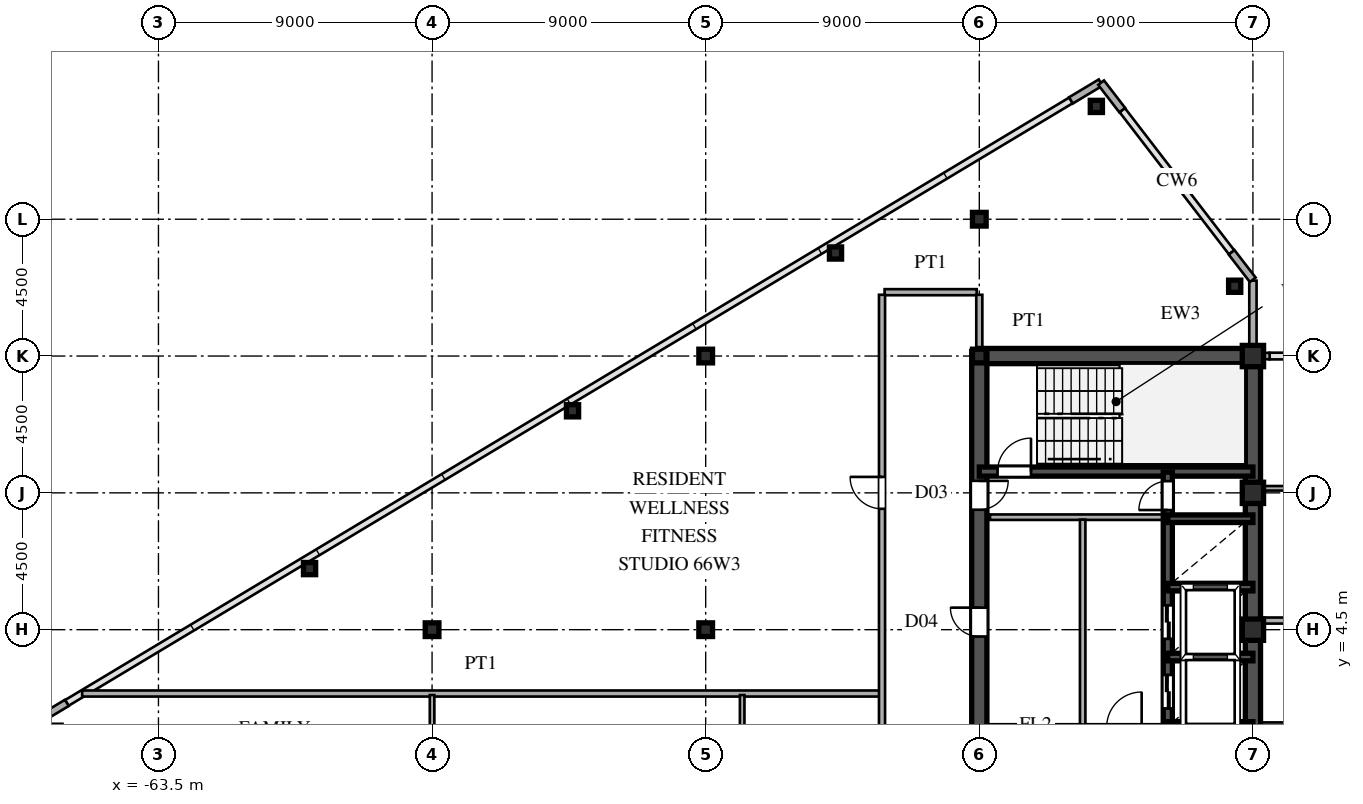
"""IFC4 building model, lengths in metres.
Left out: names, types, materials, properties, quantities, classifications, styles, units other than length and angle.
Written with IfcOpenShell. Run it as: python <this file> out.ifc"""

import sys

from ifc_helpers import new_model, si_unit, direction, frame, frame_2d, origin, origin_2d, place, context, subcontext, project, spatial, rectangle, hollow_rectangle, i_section, extrude, source, transform, mapped, element, fill, save


model = new_model("IFC4")
c1 = context("Model", 3, precision=1e-05, world=origin(), true_north=direction((0.0, 1.0)))
c2 = subcontext(c1, "Body", "Model", "MODEL_VIEW")
j1 = project(units=[si_unit("LENGTHUNIT", "METRE"), si_unit("PLANEANGLEUNIT", "RADIAN")], contexts=[c1])
p1 = place(None, origin())
s1 = spatial("IfcSite", under=j1, at=p1, CompositionType="ELEMENT")
p2 = place(p1, origin())
s2 = spatial("IfcBuilding", under=s1, at=p2, CompositionType="ELEMENT")
p3 = place(p2, frame((0.0, 0.0, 250.65)))
s3 = spatial("IfcBuildingStorey", under=s2, at=p3, CompositionType="ELEMENT", Elevation=250.65)
m1 = source(origin(), c2, "Body", "SweptSolid", [
    extrude(hollow_rectangle(XDim=0.7, YDim=0.7, WallThickness=0.03, at=origin_2d()), origin(), (0.0, 0.0, 1.0), 3.75),
])
for number, where, z_axis, x_axis in (
    (1, (-27.5, 4.5, 0.0), (0.0, 0.0, 1.0), (1.0, 0.0, 0.0)),
    (2, (-27.5, 9.0, 0.0), (0.0, 0.0, 1.0), (1.0, 0.0, 0.0)),
    (3, (-27.5, 13.5, 0.0), (0.0, 0.0, 1.0), (1.0, 0.0, 0.0)),
):
    element("IfcColumn", number, at=place(p3, frame(where, z_axis=z_axis, x_axis=x_axis)), inside=s3, PredefinedType="COLUMN", context=c2, shape_type="MappedRepresentation", body=[
        mapped(m1, transform((0.0, 0.0, 0.0), scale=1.0)),
    ])
m2 = source(origin(), c2, "Body", "SweptSolid", [
    extrude(i_section(OverallWidth=0.45, OverallDepth=0.45, WebThickness=0.016, FlangeThickness=0.025, at=origin_2d()), origin(), (0.0, 0.0, 1.0), 3.75),
])
for number, where, z_axis, x_axis in (
    (4, (-36.5, 13.5, 0.0), (0.0, 0.0, 1.0), (1.0, 0.0, 0.0)),
    (5, (-36.5, 18.0, 0.0), (0.0, 0.0, 1.0), (1.0, 0.0, 0.0)),
    (6, (-45.5, 4.5, 0.0), (0.0, 0.0, 1.0), (1.0, 0.0, 0.0)),
    (7, (-45.5, 13.5, 0.0), (0.0, 0.0, 1.0), (1.0, 0.0, 0.0)),
    (8, (-54.5, 4.5, 0.0), (0.0, 0.0, 1.0), (1.0, 0.0, 0.0)),
):
    element("IfcColumn", number, at=place(p3, frame(where, z_axis=z_axis, x_axis=x_axis)), inside=s3, PredefinedType="COLUMN", context=c2, shape_type="MappedRepresentation", body=[
        mapped(m2, transform((0.0, 0.0, 0.0), scale=1.0)),
    ])
m3 = source(origin(), c2, "Body", "SweptSolid", [
    extrude(hollow_rectangle(XDim=0.4, YDim=0.4, WallThickness=0.016, at=origin_2d()), origin(), (0.0, 0.0, 1.0), 3.75),
])
for number, where, z_axis, x_axis in (
    (9, (-28.1, 15.796, 0.0), (0.0, 0.0, 1.0), (1.0, 0.0, 0.0)),
    (10, (-32.65, 21.71, 0.0), (0.0, 0.0, 1.0), (1.0, 0.0, 0.0)),
    (11, (-41.23, 16.889, 0.0), (0.0, 0.0, 1.0), (1.0, 0.0, 0.0)),
    (12, (-49.88, 11.699, 0.0), (0.0, 0.0, 1.0), (1.0, 0.0, 0.0)),
    (13, (-58.53, 6.509, 0.0), (0.0, 0.0, 1.0), (1.0, 0.0, 0.0)),
):
    element("IfcColumn", number, at=place(p3, frame(where, z_axis=z_axis, x_axis=x_axis)), inside=s3, PredefinedType="COLUMN", context=c2, shape_type="MappedRepresentation", body=[
        mapped(m3, transform((0.0, 0.0, 0.0), scale=1.0)),
    ])
p4 = place(p3, frame((-27.5, 13.755, 0.0), z_axis=(0.0, 0.0, 1.0), x_axis=(0.0, 1.0, 0.0)))
e14 = element("IfcWall", 14, at=p4, inside=s3, PredefinedType="SOLIDWALL", context=c2, shape_type="SweptSolid", body=[
    extrude(rectangle(XDim=0.62, YDim=0.24, at=frame_2d((0.31, 0.0))), origin(), (0.0, 0.0, 1.0), 3.03),
])
p5 = place(p3, frame((-27.5, 14.375, 0.0), z_axis=(0.0, 0.0, 1.0), x_axis=(0.0, 1.0, 0.0)))
e15 = element("IfcWall", 15, at=p5, inside=s3, PredefinedType="SOLIDWALL", context=c2, shape_type="SweptSolid", body=[
    extrude(rectangle(XDim=1.605, YDim=0.24, at=frame_2d((0.803, 0.0))), origin(), (0.0, 0.0, 1.0), 3.53),
])
for number, where, z_axis, x_axis in (
    (16, (-27.506, 16.008, 0.0), (0.0, 0.0, 1.0), (-0.61, 0.793, 0.0)),
    (17, (-31.799, 21.588, 0.0), (0.0, 0.0, 1.0), (-0.61, 0.793, 0.0)),
    (18, (-32.509, 22.495, 0.0), (0.0, 0.0, 1.0), (-0.857, -0.515, 0.0)),
    (19, (-66.514, 2.092, 0.0), (0.0, 0.0, 1.0), (-0.857, -0.515, 0.0)),
):
    element("IfcWall", number, at=place(p3, frame(where, z_axis=z_axis, x_axis=x_axis)), inside=s3, PredefinedType="SOLIDWALL", context=c2, shape_type="SweptSolid", body=[
        extrude(rectangle(XDim=1.14, YDim=0.24, at=frame_2d((0.57, 0.0))), origin(), (0.0, 0.0, 1.0), 3.53),
    ])
p6 = place(p3, frame((-27.49, 13.5, 0.0), z_axis=(0.0, 0.0, 1.0), x_axis=(1.0, 0.0, 0.0)))
e20 = element("IfcWall", 20, at=p6, inside=s3, PredefinedType="SOLIDWALL", context=c2, shape_type="SweptSolid", body=[
    extrude(rectangle(XDim=0.54, YDim=0.21, at=frame_2d((0.27, 0.0))), origin(), (0.0, 0.0, 1.0), 3.03),
])
p7 = place(p3, frame((-27.5, 1.3, 0.0), z_axis=(0.0, 0.0, 1.0), x_axis=(0.0, 1.0, 0.0)))
e21 = element("IfcWall", 21, at=p7, inside=s3, PredefinedType="SHEAR", context=c2, shape_type="SweptSolid", body=[
    extrude(rectangle(XDim=12.2, YDim=0.5, at=frame_2d((6.1, 0.0))), origin(), (0.0, 0.0, 1.0), 3.53),
])
p8 = place(p3, frame((-36.5, 13.5, 0.0), z_axis=(0.0, 0.0, 1.0), x_axis=(1.0, 0.0, 0.0)))
e22 = element("IfcWall", 22, at=p8, inside=s3, PredefinedType="SHEAR", context=c2, shape_type="SweptSolid", body=[
    extrude(rectangle(XDim=9.0, YDim=0.5, at=frame_2d((4.5, 0.0))), origin(), (0.0, 0.0, 1.0), 3.53),
])
p9 = place(p3, frame((-36.5, 8.2, 0.0), z_axis=(0.0, 0.0, 1.0), x_axis=(0.0, 1.0, 0.0)))
e23 = element("IfcWall", 23, at=p9, inside=s3, PredefinedType="SHEAR", context=c2, shape_type="SweptSolid", body=[
    extrude(rectangle(XDim=5.45, YDim=0.5, at=frame_2d((2.725, 0.0))), origin(), (0.0, 0.0, 1.0), 3.53),
])
p10 = place(p9, frame((0.245, 0.0, 0.0)))
e24 = element("IfcOpeningElement", 24, at=p10, cuts=e23, PredefinedType="OPENING", context=c2, shape_type="SweptSolid", body=[
    extrude(rectangle(XDim=0.95, YDim=2.15, at=frame_2d((0.475, 1.075))), frame((0.0, 0.26, 0.0), z_axis=(0.0, -1.0, 0.0), x_axis=(1.0, 0.0, 0.0)), (0.0, 0.0, 1.0), 0.52),
])
p11 = place(p3, frame((-36.5, 1.3, 0.0), z_axis=(0.0, 0.0, 1.0), x_axis=(0.0, 1.0, 0.0)))
e25 = element("IfcWall", 25, at=p11, inside=s3, PredefinedType="SHEAR", context=c2, shape_type="SweptSolid", body=[
    extrude(rectangle(XDim=6.9, YDim=0.5, at=frame_2d((3.45, 0.0))), origin(), (0.0, 0.0, 1.0), 3.53),
])
p12 = place(p11, frame((2.975, 0.0, 0.0)))
e26 = element("IfcOpeningElement", 26, at=p12, cuts=e25, PredefinedType="OPENING", context=c2, shape_type="SweptSolid", body=[
    extrude(rectangle(XDim=0.95, YDim=2.15, at=frame_2d((0.475, 1.075))), frame((0.0, 0.26, 0.0), z_axis=(0.0, -1.0, 0.0), x_axis=(1.0, 0.0, 0.0)), (0.0, 0.0, 1.0), 0.52),
])
p13 = place(p3, frame((-36.5, 9.7, 0.0), z_axis=(0.0, 0.0, 1.0), x_axis=(1.0, 0.0, 0.0)))
e27 = element("IfcWall", 27, at=p13, inside=s3, PredefinedType="SHEAR", context=c2, shape_type="SweptSolid", body=[
    extrude(rectangle(XDim=9.0, YDim=0.3, at=frame_2d((4.5, 0.0))), origin(), (0.0, 0.0, 1.0), 3.53),
])
p14 = place(p13, frame((0.6, 0.0, 0.0)))
e28 = element("IfcOpeningElement", 28, at=p14, cuts=e27, PredefinedType="OPENING", context=c2, shape_type="SweptSolid", body=[
    extrude(rectangle(XDim=1.1, YDim=2.2, at=frame_2d((0.55, 1.1))), frame((0.0, 0.16, 0.0), z_axis=(0.0, -1.0, 0.0), x_axis=(1.0, 0.0, 0.0)), (0.0, 0.0, 1.0), 0.32),
])
for number, where, z_axis, x_axis in (
    (29, (-30.3, 1.35, 0.0), (0.0, 0.0, 1.0), (1.0, 0.0, 0.0)),
    (30, (-30.3, 3.6, 0.0), (0.0, 0.0, 1.0), (1.0, 0.0, 0.0)),
    (31, (-30.3, 5.9, 0.0), (0.0, 0.0, 1.0), (1.0, 0.0, 0.0)),
    (32, (-30.3, 8.15, 0.0), (0.0, 0.0, 1.0), (1.0, 0.0, 0.0)),
):
    element("IfcWall", number, at=place(p3, frame(where, z_axis=z_axis, x_axis=x_axis)), inside=s3, PredefinedType="SHEAR", context=c2, shape_type="SweptSolid", body=[
        extrude(rectangle(XDim=2.8, YDim=0.25, at=frame_2d((1.4, 0.0))), origin(), (0.0, 0.0, 1.0), 3.53),
    ])
p15 = place(p3, frame((-30.3, 1.32, 0.0), z_axis=(0.0, 0.0, 1.0), x_axis=(0.0, 1.0, 0.0)))
e33 = element("IfcWall", 33, at=p15, inside=s3, PredefinedType="SHEAR", context=c2, shape_type="SweptSolid", body=[
    extrude(rectangle(XDim=2.28, YDim=0.3, at=frame_2d((1.14, 0.0))), origin(), (0.0, 0.0, 1.0), 3.53),
])
p16 = place(p15, frame((0.59, 0.0, 0.0)))
e34 = element("IfcOpeningElement", 34, at=p16, cuts=e33, PredefinedType="OPENING", context=c2, shape_type="SweptSolid", body=[
    extrude(rectangle(XDim=1.1, YDim=2.2, at=frame_2d((0.55, 1.1))), frame((0.0, 0.16, 0.0), z_axis=(0.0, -1.0, 0.0), x_axis=(1.0, 0.0, 0.0)), (0.0, 0.0, 1.0), 0.32),
])
p17 = place(p3, frame((-30.3, 3.6, 0.0), z_axis=(0.0, 0.0, 1.0), x_axis=(0.0, 1.0, 0.0)))
e35 = element("IfcWall", 35, at=p17, inside=s3, PredefinedType="SHEAR", context=c2, shape_type="SweptSolid", body=[
    extrude(rectangle(XDim=2.3, YDim=0.3, at=frame_2d((1.15, 0.0))), origin(), (0.0, 0.0, 1.0), 3.53),
])
p18 = place(p17, frame((0.6, 0.0, 0.0)))
e36 = element("IfcOpeningElement", 36, at=p18, cuts=e35, PredefinedType="OPENING", context=c2, shape_type="SweptSolid", body=[
    extrude(rectangle(XDim=1.1, YDim=2.2, at=frame_2d((0.55, 1.1))), frame((0.0, 0.16, 0.0), z_axis=(0.0, -1.0, 0.0), x_axis=(1.0, 0.0, 0.0)), (0.0, 0.0, 1.0), 0.32),
])
p19 = place(p3, frame((-30.3, 5.9, 0.0), z_axis=(0.0, 0.0, 1.0), x_axis=(0.0, 1.0, 0.0)))
e37 = element("IfcWall", 37, at=p19, inside=s3, PredefinedType="SHEAR", context=c2, shape_type="SweptSolid", body=[
    extrude(rectangle(XDim=2.25, YDim=0.3, at=frame_2d((1.125, 0.0))), origin(), (0.0, 0.0, 1.0), 3.53),
])
p20 = place(p3, frame((-30.3, 8.15, 0.0), z_axis=(0.0, 0.0, 1.0), x_axis=(0.0, 1.0, 0.0)))
e38 = element("IfcWall", 38, at=p20, inside=s3, PredefinedType="SHEAR", context=c2, shape_type="SweptSolid", body=[
    extrude(rectangle(XDim=1.53, YDim=0.3, at=frame_2d((0.765, 0.0))), origin(), (0.0, 0.0, 1.0), 3.53),
])
p21 = place(p20, frame((0.285, 0.0, 0.0)))
e39 = element("IfcOpeningElement", 39, at=p21, cuts=e38, PredefinedType="OPENING", context=c2, shape_type="SweptSolid", body=[
    extrude(rectangle(XDim=0.95, YDim=2.15, at=frame_2d((0.475, 1.075))), frame((0.0, 0.16, 0.0), z_axis=(0.0, -1.0, 0.0), x_axis=(1.0, 0.0, 0.0)), (0.0, 0.0, 1.0), 0.32),
])
p22 = place(p3, frame((-36.15, 8.2, 0.0), z_axis=(0.0, 0.0, 1.0), x_axis=(1.0, 0.0, 0.0)))
e40 = element("IfcWall", 40, at=p22, inside=s3, PredefinedType="PARTITIONING", context=c2, shape_type="SweptSolid", body=[
    extrude(rectangle(XDim=5.7, YDim=0.18, at=frame_2d((2.85, 0.0))), origin(), (0.0, 0.0, 1.0), 3.53),
])
p23 = place(p3, frame((-33.1, 1.38, 0.0), z_axis=(0.0, 0.0, 1.0), x_axis=(0.0, 1.0, 0.0)))
e41 = element("IfcWall", 41, at=p23, inside=s3, PredefinedType="PARTITIONING", context=c2, shape_type="SweptSolid", body=[
    extrude(rectangle(XDim=6.74, YDim=0.18, at=frame_2d((3.37, 0.0))), origin(), (0.0, 0.0, 1.0), 3.53),
])
p24 = place(p3, frame((-27.245, 1.35, 0.0), z_axis=(0.0, 0.0, 1.0), x_axis=(1.0, 0.0, 0.0)))
e42 = element("IfcWall", 42, at=p24, inside=s3, PredefinedType="PARTITIONING", context=c2, shape_type="SweptSolid", body=[
    extrude(rectangle(XDim=20.16, YDim=0.2, at=frame_2d((10.08, 0.0))), origin(), (0.0, 0.0, 1.0), 3.53),
])
p25 = place(p24, frame((12.97, 0.0, 0.0)))
e43 = element("IfcOpeningElement", 43, at=p25, cuts=e42, PredefinedType="OPENING", context=c2, shape_type="SweptSolid", body=[
    extrude(rectangle(XDim=1.05, YDim=2.25, at=frame_2d((0.525, 1.125))), frame((0.0, 0.11, 0.0), z_axis=(0.0, -1.0, 0.0), x_axis=(1.0, 0.0, 0.0)), (0.0, 0.0, 1.0), 0.22),
])
p26 = place(p3, frame((-66.01, 2.4, 0.0), z_axis=(0.0, 0.0, 1.0), x_axis=(1.0, 0.0, 0.0)))
e44 = element("IfcWall", 44, at=p26, inside=s3, PredefinedType="PARTITIONING", context=c2, shape_type="SweptSolid", body=[
    extrude(rectangle(XDim=26.23, YDim=0.2, at=frame_2d((13.115, 0.0))), origin(), (0.0, 0.0, 1.0), 3.53),
])
p27 = place(p3, frame((-27.245, 4.8, 0.0), z_axis=(0.0, 0.0, 1.0), x_axis=(1.0, 0.0, 0.0)))
e45 = element("IfcWall", 45, at=p27, inside=s3, PredefinedType="PARTITIONING", context=c2, shape_type="SweptSolid", body=[
    extrude(rectangle(XDim=54.49, YDim=0.2, at=frame_2d((27.245, 0.0))), origin(), (0.0, 0.0, 1.0), 3.53),
])
p28 = place(p27, frame((24.97, 0.0, 0.0)))
e46 = element("IfcOpeningElement", 46, at=p28, cuts=e45, PredefinedType="OPENING", context=c2, shape_type="SweptSolid", body=[
    extrude(rectangle(XDim=1.05, YDim=2.25, at=frame_2d((0.525, 1.125))), frame((0.0, 0.11, 0.0), z_axis=(0.0, -1.0, 0.0), x_axis=(1.0, 0.0, 0.0)), (0.0, 0.0, 1.0), 0.22),
])
p29 = place(p3, frame((-27.245, 9.15, 0.0), z_axis=(0.0, 0.0, 1.0), x_axis=(1.0, 0.0, 0.0)))
e47 = element("IfcWall", 47, at=p29, inside=s3, PredefinedType="PARTITIONING", context=c2, shape_type="SweptSolid", body=[
    extrude(rectangle(XDim=7.66, YDim=0.15, at=frame_2d((3.83, 0.0))), origin(), (0.0, 0.0, 1.0), 3.53),
])
p30 = place(p29, frame((3.57, 0.0, 0.0)))
e48 = element("IfcOpeningElement", 48, at=p30, cuts=e47, PredefinedType="OPENING", context=c2, shape_type="SweptSolid", body=[
    extrude(rectangle(XDim=0.95, YDim=2.15, at=frame_2d((0.475, 1.075))), frame((0.0, 0.085, 0.0), z_axis=(0.0, -1.0, 0.0), x_axis=(1.0, 0.0, 0.0)), (0.0, 0.0, 1.0), 0.17),
])
p31 = place(p3, frame((-39.615, 15.6, 0.0), z_axis=(0.0, 0.0, 1.0), x_axis=(1.0, 0.0, 0.0)))
e49 = element("IfcWall", 49, at=p31, inside=s3, PredefinedType="PARTITIONING", context=c2, shape_type="SweptSolid", body=[
    extrude(rectangle(XDim=3.03, YDim=0.2, at=frame_2d((1.515, 0.0))), origin(), (0.0, 0.0, 1.0), 3.53),
])
p32 = place(p3, frame((-54.5, -9.335, 0.0), z_axis=(0.0, 0.0, 1.0), x_axis=(0.0, 1.0, 0.0)))
e50 = element("IfcWall", 50, at=p32, inside=s3, PredefinedType="PARTITIONING", context=c2, shape_type="SweptSolid", body=[
    extrude(rectangle(XDim=11.685, YDim=0.15, at=frame_2d((5.843, 0.0))), origin(), (0.0, 0.0, 1.0), 2.93),
])
p33 = place(p32, frame((5.107, 0.0, 0.0)))
e51 = element("IfcOpeningElement", 51, at=p33, cuts=e50, PredefinedType="OPENING", context=c2, shape_type="SweptSolid", body=[
    extrude(rectangle(XDim=0.95, YDim=2.15, at=frame_2d((0.475, 1.075))), frame((0.0, 0.085, 0.0), z_axis=(0.0, -1.0, 0.0), x_axis=(1.0, 0.0, 0.0)), (0.0, 0.0, 1.0), 0.17),
])
p34 = place(p32, frame((1.21, 0.0, 0.0)))
e52 = element("IfcOpeningElement", 52, at=p34, cuts=e50, PredefinedType="OPENING", context=c2, shape_type="SweptSolid", body=[
    extrude(rectangle(XDim=0.95, YDim=2.15, at=frame_2d((0.475, 1.075))), frame((0.0, 0.085, 0.0), z_axis=(0.0, -1.0, 0.0), x_axis=(1.0, 0.0, 0.0)), (0.0, 0.0, 1.0), 0.17),
])
p35 = place(p32, frame((9.16, 0.0, 0.0)))
e53 = element("IfcOpeningElement", 53, at=p35, cuts=e50, PredefinedType="OPENING", context=c2, shape_type="SweptSolid", body=[
    extrude(rectangle(XDim=0.95, YDim=2.15, at=frame_2d((0.475, 1.075))), frame((0.0, 0.085, 0.0), z_axis=(0.0, -1.0, 0.0), x_axis=(1.0, 0.0, 0.0)), (0.0, 0.0, 1.0), 0.17),
])
p36 = place(p3, frame((-44.3, -1.328, 0.0), z_axis=(0.0, 0.0, 1.0), x_axis=(0.0, 1.0, 0.0)))
e54 = element("IfcWall", 54, at=p36, inside=s3, PredefinedType="PARTITIONING", context=c2, shape_type="SweptSolid", body=[
    extrude(rectangle(XDim=3.678, YDim=0.15, at=frame_2d((1.839, 0.0))), origin(), (0.0, 0.0, 1.0), 3.53),
])
p37 = place(p3, frame((-39.7, -15.515, 0.0), z_axis=(0.0, 0.0, 1.0), x_axis=(0.0, 1.0, 0.0)))
e55 = element("IfcWall", 55, at=p37, inside=s3, PredefinedType="PARTITIONING", context=c2, shape_type="SweptSolid", body=[
    extrude(rectangle(XDim=31.03, YDim=0.2, at=frame_2d((15.515, 0.0))), origin(), (0.0, 0.0, 1.0), 3.53),
])
p38 = place(p37, frame((2.09, 0.0, 0.0)))
e56 = element("IfcOpeningElement", 56, at=p38, cuts=e55, PredefinedType="OPENING", context=c2, shape_type="SweptSolid", body=[
    extrude(rectangle(XDim=1.05, YDim=2.25, at=frame_2d((0.525, 1.125))), frame((0.0, 0.11, 0.0), z_axis=(0.0, -1.0, 0.0), x_axis=(1.0, 0.0, 0.0)), (0.0, 0.0, 1.0), 0.22),
])
p39 = place(p37, frame((10.901, 0.0, 0.0)))
e57 = element("IfcOpeningElement", 57, at=p39, cuts=e55, PredefinedType="OPENING", context=c2, shape_type="SweptSolid", body=[
    extrude(rectangle(XDim=1.05, YDim=2.25, at=frame_2d((0.525, 1.125))), frame((0.0, 0.11, 0.0), z_axis=(0.0, -1.0, 0.0), x_axis=(1.0, 0.0, 0.0)), (0.0, 0.0, 1.0), 0.22),
])
p40 = place(p37, frame((23.99, 0.0, 0.0)))
e58 = element("IfcOpeningElement", 58, at=p40, cuts=e55, PredefinedType="OPENING", context=c2, shape_type="SweptSolid", body=[
    extrude(rectangle(XDim=1.05, YDim=2.25, at=frame_2d((0.525, 1.125))), frame((0.0, 0.11, 0.0), z_axis=(0.0, -1.0, 0.0), x_axis=(1.0, 0.0, 0.0)), (0.0, 0.0, 1.0), 0.22),
])
p41 = place(p3, frame((-36.5, 13.755, 0.0), z_axis=(0.0, 0.0, 1.0), x_axis=(0.0, 1.0, 0.0)))
e59 = element("IfcWall", 59, at=p41, inside=s3, PredefinedType="PARTITIONING", context=c2, shape_type="SweptSolid", body=[
    extrude(rectangle(XDim=1.76, YDim=0.2, at=frame_2d((0.88, 0.0))), origin(), (0.0, 0.0, 1.0), 2.93),
])
m4 = source(origin(), c2, "Body", "SweptSolid", [
    extrude(rectangle(XDim=0.95, YDim=2.15, at=frame_2d((0.475, 1.075))), frame((0.0, 0.025, 0.0), z_axis=(0.0, -1.0, 0.0), x_axis=(1.0, 0.0, 0.0)), (0.0, 0.0, 1.0), 0.05),
])
p42 = place(p10, frame((0.95, 0.0, 0.0), z_axis=(0.0, 0.0, 1.0), x_axis=(-1.0, 0.0, 0.0)))
e60 = element("IfcDoor", 60, at=p42, inside=s3, OperationType="SINGLE_SWING_RIGHT", PredefinedType="DOOR", context=c2, shape_type="MappedRepresentation", body=[
    mapped(m4, transform((0.0, 0.0, 0.0), scale=1.0)),
])
fill(e24, e60)
p43 = place(p12, origin())
e61 = element("IfcDoor", 61, at=p43, inside=s3, OperationType="SINGLE_SWING_RIGHT", PredefinedType="DOOR", context=c2, shape_type="MappedRepresentation", body=[
    mapped(m4, transform((0.0, 0.0, 0.0), scale=1.0)),
])
fill(e26, e61)
m5 = source(origin(), c2, "Body", "SweptSolid", [
    extrude(rectangle(XDim=1.1, YDim=2.2, at=frame_2d((0.55, 1.1))), frame((0.0, 0.025, 0.0), z_axis=(0.0, -1.0, 0.0), x_axis=(1.0, 0.0, 0.0)), (0.0, 0.0, 1.0), 0.05),
])
p44 = place(p14, origin())
e62 = element("IfcDoor", 62, at=p44, inside=s3, OperationType="SINGLE_SWING_RIGHT", PredefinedType="DOOR", context=c2, shape_type="MappedRepresentation", body=[
    mapped(m5, transform((0.0, 0.0, 0.0), scale=1.0)),
])
fill(e28, e62)
m6 = source(origin(), c2, "Body", "SweptSolid", [
    extrude(rectangle(XDim=1.1, YDim=2.2, at=frame_2d((0.55, 1.1))), frame((0.0, 0.025, 0.0), z_axis=(0.0, -1.0, 0.0), x_axis=(1.0, 0.0, 0.0)), (0.0, 0.0, 1.0), 0.05),
])
p45 = place(p16, origin())
e63 = element("IfcDoor", 63, at=p45, inside=s3, OperationType="DOUBLE_DOOR_SLIDING", PredefinedType="DOOR", context=c2, shape_type="MappedRepresentation", body=[
    mapped(m6, transform((0.0, 0.0, 0.0), scale=1.0)),
])
fill(e34, e63)
p46 = place(p18, origin())
e64 = element("IfcDoor", 64, at=p46, inside=s3, OperationType="DOUBLE_DOOR_SLIDING", PredefinedType="DOOR", context=c2, shape_type="MappedRepresentation", body=[
    mapped(m6, transform((0.0, 0.0, 0.0), scale=1.0)),
])
fill(e36, e64)
p47 = place(p21, origin())
e65 = element("IfcDoor", 65, at=p47, inside=s3, OperationType="SINGLE_SWING_LEFT", PredefinedType="DOOR", context=c2, shape_type="MappedRepresentation", body=[
    mapped(m4, transform((0.0, 0.0, 0.0), scale=1.0)),
])
fill(e39, e65)
m7 = source(origin(), c2, "Body", "SweptSolid", [
    extrude(rectangle(XDim=1.05, YDim=2.25, at=frame_2d((0.525, 1.125))), frame((0.0, 0.025, 0.0), z_axis=(0.0, -1.0, 0.0), x_axis=(1.0, 0.0, 0.0)), (0.0, 0.0, 1.0), 0.05),
])
p48 = place(p40, origin())
e66 = element("IfcDoor", 66, at=p48, inside=s3, OperationType="SINGLE_SWING_RIGHT", PredefinedType="DOOR", context=c2, shape_type="MappedRepresentation", body=[
    mapped(m7, transform((0.0, 0.0, 0.0), scale=1.0)),
])
fill(e58, e66)
save(model, sys.argv[1])
